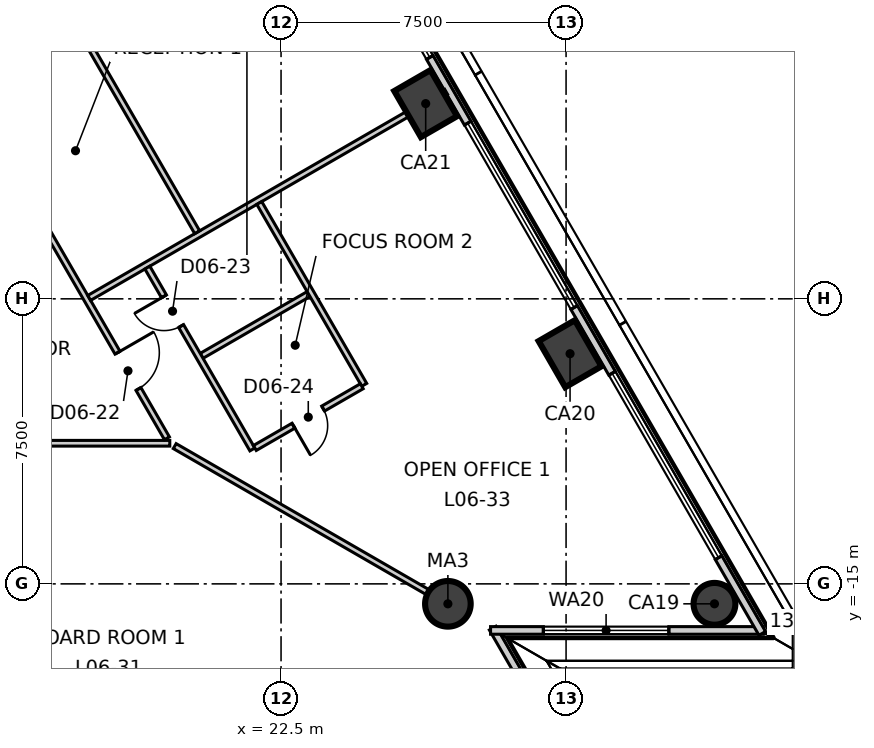
"""IFC4 building model, lengths in metres.
Left out: names, types, materials, properties, quantities, classifications, styles, units other than length and angle.
Written with IfcOpenShell. Run it as: python <this file> out.ifc"""

import sys

from ifc_helpers import new_model, si_unit, direction, frame, frame_2d, origin, origin_2d, place, context, subcontext, project, spatial, rectangle, circle, extrude, element, fill, save


model = new_model("IFC4")
c1 = context("Model", 3, precision=1e-05, world=origin(), true_north=direction((0.0, 1.0)))
c2 = subcontext(c1, "Body", "Model", "MODEL_VIEW")
j1 = project(units=[si_unit("LENGTHUNIT", "METRE"), si_unit("PLANEANGLEUNIT", "RADIAN")], contexts=[c1])
p1 = place(None, origin())
s1 = spatial("IfcSite", under=j1, at=p1, CompositionType="ELEMENT")
p2 = place(p1, origin())
s2 = spatial("IfcBuilding", under=s1, at=p2, CompositionType="ELEMENT")
p3 = place(p2, frame((0.0, 0.0, 35.3)))
s3 = spatial("IfcBuildingStorey", under=s2, at=p3, CompositionType="ELEMENT", Elevation=35.3)
p4 = place(p3, frame((33.905, -15.525, -0.3), z_axis=(0.0, 0.0, 1.0), x_axis=(-0.5, 0.866025403784, 0.0)))
e1 = element("IfcColumn", 1, at=p4, inside=s3, PredefinedType="COLUMN", context=c2, shape_type="SweptSolid", body=[
    extrude(circle(Radius=0.55, at=origin_2d()), origin(), (0.0, 0.0, 1.0), 4.0),
])
for number, where, z_axis, x_axis in (
    (2, (30.105, -8.944, -0.3), (0.0, 0.0, 1.0), (-0.5, 0.866, 0.0)),
    (3, (26.306, -2.363, -0.3), (0.0, 0.0, 1.0), (-0.5, 0.866, 0.0)),
):
    element("IfcColumn", number, at=place(p3, frame(where, z_axis=z_axis, x_axis=x_axis)), inside=s3, PredefinedType="COLUMN", context=c2, shape_type="SweptSolid", body=[
        extrude(rectangle(XDim=1.4, YDim=1.1, at=origin_2d()), origin(), (0.0, 0.0, 1.0), 4.0),
    ])
p5 = place(p3, frame((26.89, -15.525, -0.3), z_axis=(0.0, 0.0, 1.0), x_axis=(1.0, 0.0, 0.0)))
e4 = element("IfcColumn", 4, at=p5, inside=s3, PredefinedType="COLUMN", context=c2, shape_type="SweptSolid", body=[
    extrude(circle(Radius=0.6, at=origin_2d()), origin(), (0.0, 0.0, 1.0), 4.0),
])
p6 = place(p3, frame((31.655, -22.378, 0.0), z_axis=(0.0, 0.0, 1.0), x_axis=(-0.499930606701, 0.866065464318, 0.0)))
e5 = element("IfcWall", 5, at=p6, inside=s3, PredefinedType="ELEMENTEDWALL", context=c2, shape_type="SweptSolid", body=[
    extrude(rectangle(XDim=7.175, YDim=0.2, at=frame_2d((3.587, 0.0))), origin(), (0.0, 0.0, 1.0), 3.7),
])
p7 = place(p6, frame((1.99, 0.0, 0.9)))
e6 = element("IfcOpeningElement", 6, at=p7, cuts=e5, PredefinedType="OPENING", context=c2, shape_type="SweptSolid", body=[
    extrude(rectangle(XDim=3.3, YDim=2.5, at=frame_2d((1.65, 1.25))), frame((0.0, 0.11, 0.0), z_axis=(0.0, -1.0, 0.0), x_axis=(1.0, 0.0, 0.0)), (0.0, 0.0, 1.0), 0.22),
])
p8 = place(p3, frame((28.013, -16.225, 0.0), z_axis=(0.0, 0.0, 1.0), x_axis=(1.0, 0.0, 0.0)))
e7 = element("IfcWall", 7, at=p8, inside=s3, PredefinedType="ELEMENTEDWALL", context=c2, shape_type="SweptSolid", body=[
    extrude(rectangle(XDim=7.175, YDim=0.2, at=frame_2d((3.587, 0.0))), origin(), (0.0, 0.0, 1.0), 3.7),
])
p9 = place(p8, frame((1.39, 0.0, 0.9)))
e8 = element("IfcOpeningElement", 8, at=p9, cuts=e7, PredefinedType="OPENING", context=c2, shape_type="SweptSolid", body=[
    extrude(rectangle(XDim=3.3, YDim=2.5, at=frame_2d((1.65, 1.25))), frame((0.0, 0.11, 0.0), z_axis=(0.0, -1.0, 0.0), x_axis=(1.0, 0.0, 0.0)), (0.0, 0.0, 1.0), 0.22),
])
p10 = place(p3, frame((35.163, -16.303, 0.0), z_axis=(0.0, 0.0, 1.0), x_axis=(-0.500012207976, 0.866018355391, 0.0)))
e9 = element("IfcWall", 9, at=p10, inside=s3, PredefinedType="ELEMENTEDWALL", context=c2, shape_type="SweptSolid", body=[
    extrude(rectangle(XDim=63.381, YDim=0.2, at=frame_2d((31.69, 0.0))), origin(), (0.0, 0.0, 1.0), 3.7),
])
p11 = place(p10, frame((2.302, 0.0, 0.9)))
e10 = element("IfcOpeningElement", 10, at=p11, cuts=e9, PredefinedType="OPENING", context=c2, shape_type="SweptSolid", body=[
    extrude(rectangle(XDim=5.6, YDim=2.5, at=frame_2d((2.8, 1.25))), frame((0.0, 0.11, 0.0), z_axis=(0.0, -1.0, 0.0), x_axis=(1.0, 0.0, 0.0)), (0.0, 0.0, 1.0), 0.22),
])
p12 = place(p10, frame((9.902, 0.0, 0.9)))
e11 = element("IfcOpeningElement", 11, at=p12, cuts=e9, PredefinedType="OPENING", context=c2, shape_type="SweptSolid", body=[
    extrude(rectangle(XDim=5.6, YDim=2.5, at=frame_2d((2.8, 1.25))), frame((0.0, 0.11, 0.0), z_axis=(0.0, -1.0, 0.0), x_axis=(1.0, 0.0, 0.0)), (0.0, 0.0, 1.0), 0.22),
])
p13 = place(p10, frame((17.501, 0.0, 0.9)))
e12 = element("IfcOpeningElement", 12, at=p13, cuts=e9, PredefinedType="OPENING", context=c2, shape_type="SweptSolid", body=[
    extrude(rectangle(XDim=5.6, YDim=2.5, at=frame_2d((2.8, 1.25))), frame((0.0, 0.11, 0.0), z_axis=(0.0, -1.0, 0.0), x_axis=(1.0, 0.0, 0.0)), (0.0, 0.0, 1.0), 0.22),
])
p14 = place(p10, frame((25.101, 0.0, 0.9)))
e13 = element("IfcOpeningElement", 13, at=p14, cuts=e9, PredefinedType="OPENING", context=c2, shape_type="SweptSolid", body=[
    extrude(rectangle(XDim=5.6, YDim=2.5, at=frame_2d((2.8, 1.25))), frame((0.0, 0.11, 0.0), z_axis=(0.0, -1.0, 0.0), x_axis=(1.0, 0.0, 0.0)), (0.0, 0.0, 1.0), 0.22),
])
p15 = place(p10, frame((32.7, 0.0, 0.9)))
e14 = element("IfcOpeningElement", 14, at=p15, cuts=e9, PredefinedType="OPENING", context=c2, shape_type="SweptSolid", body=[
    extrude(rectangle(XDim=5.6, YDim=2.5, at=frame_2d((2.8, 1.25))), frame((0.0, 0.11, 0.0), z_axis=(0.0, -1.0, 0.0), x_axis=(1.0, 0.0, 0.0)), (0.0, 0.0, 1.0), 0.22),
])
p16 = place(p10, frame((40.299, 0.0, 0.9)))
e15 = element("IfcOpeningElement", 15, at=p16, cuts=e9, PredefinedType="OPENING", context=c2, shape_type="SweptSolid", body=[
    extrude(rectangle(XDim=5.6, YDim=2.5, at=frame_2d((2.8, 1.25))), frame((0.0, 0.11, 0.0), z_axis=(0.0, -1.0, 0.0), x_axis=(1.0, 0.0, 0.0)), (0.0, 0.0, 1.0), 0.22),
])
p17 = place(p10, frame((47.899, 0.0, 0.9)))
e16 = element("IfcOpeningElement", 16, at=p17, cuts=e9, PredefinedType="OPENING", context=c2, shape_type="SweptSolid", body=[
    extrude(rectangle(XDim=5.6, YDim=2.5, at=frame_2d((2.8, 1.25))), frame((0.0, 0.11, 0.0), z_axis=(0.0, -1.0, 0.0), x_axis=(1.0, 0.0, 0.0)), (0.0, 0.0, 1.0), 0.22),
])
p18 = place(p10, frame((55.498, 0.0, 0.9)))
e17 = element("IfcOpeningElement", 17, at=p18, cuts=e9, PredefinedType="OPENING", context=c2, shape_type="SweptSolid", body=[
    extrude(rectangle(XDim=5.6, YDim=2.5, at=frame_2d((2.8, 1.25))), frame((0.0, 0.11, 0.0), z_axis=(0.0, -1.0, 0.0), x_axis=(1.0, 0.0, 0.0)), (0.0, 0.0, 1.0), 0.22),
])
p19 = place(p3, frame((-19.422, -11.3, 0.0), z_axis=(0.0, 0.0, 1.0), x_axis=(1.0, 0.0, 0.0)))
e18 = element("IfcWall", 18, at=p19, inside=s3, PredefinedType="PARTITIONING", context=c2, shape_type="SweptSolid", body=[
    extrude(rectangle(XDim=38.994, YDim=0.15, at=frame_2d((19.497, 0.0))), origin(), (0.0, 0.0, 1.0), 3.7),
])
p20 = place(p19, frame((1.5, 0.0, 0.0)))
e19 = element("IfcOpeningElement", 19, at=p20, cuts=e18, PredefinedType="OPENING", context=c2, shape_type="SweptSolid", body=[
    extrude(rectangle(XDim=1.1, YDim=2.1, at=frame_2d((0.55, 1.05))), frame((0.0, 0.085, 0.0), z_axis=(0.0, -1.0, 0.0), x_axis=(1.0, 0.0, 0.0)), (0.0, 0.0, 1.0), 0.17),
])
p21 = place(p19, frame((8.674, 0.0, 0.0)))
e20 = element("IfcOpeningElement", 20, at=p21, cuts=e18, PredefinedType="OPENING", context=c2, shape_type="SweptSolid", body=[
    extrude(rectangle(XDim=1.0, YDim=2.1, at=frame_2d((0.5, 1.05))), frame((0.0, 0.085, 0.0), z_axis=(0.0, -1.0, 0.0), x_axis=(1.0, 0.0, 0.0)), (0.0, 0.0, 1.0), 0.17),
])
p22 = place(p19, frame((4.974, 0.0, 0.0)))
e21 = element("IfcOpeningElement", 21, at=p22, cuts=e18, PredefinedType="OPENING", context=c2, shape_type="SweptSolid", body=[
    extrude(rectangle(XDim=0.9, YDim=2.1, at=frame_2d((0.45, 1.05))), frame((0.0, 0.085, 0.0), z_axis=(0.0, -1.0, 0.0), x_axis=(1.0, 0.0, 0.0)), (0.0, 0.0, 1.0), 0.17),
])
p23 = place(p19, frame((23.273, 0.0, 0.0)))
e22 = element("IfcOpeningElement", 22, at=p23, cuts=e18, PredefinedType="OPENING", context=c2, shape_type="SweptSolid", body=[
    extrude(rectangle(XDim=1.1, YDim=2.1, at=frame_2d((0.55, 1.05))), frame((0.0, 0.085, 0.0), z_axis=(0.0, -1.0, 0.0), x_axis=(1.0, 0.0, 0.0)), (0.0, 0.0, 1.0), 0.17),
])
p24 = place(p19, frame((12.973, 0.0, 0.0)))
e23 = element("IfcOpeningElement", 23, at=p24, cuts=e18, PredefinedType="OPENING", context=c2, shape_type="SweptSolid", body=[
    extrude(rectangle(XDim=0.9, YDim=2.1, at=frame_2d((0.45, 1.05))), frame((0.0, 0.085, 0.0), z_axis=(0.0, -1.0, 0.0), x_axis=(1.0, 0.0, 0.0)), (0.0, 0.0, 1.0), 0.17),
])
p25 = place(p19, frame((16.173, 0.0, 0.0)))
e24 = element("IfcOpeningElement", 24, at=p25, cuts=e18, PredefinedType="OPENING", context=c2, shape_type="SweptSolid", body=[
    extrude(rectangle(XDim=0.9, YDim=2.1, at=frame_2d((0.45, 1.05))), frame((0.0, 0.085, 0.0), z_axis=(0.0, -1.0, 0.0), x_axis=(1.0, 0.0, 0.0)), (0.0, 0.0, 1.0), 0.17),
])
p26 = place(p19, frame((18.873, 0.0, 0.0)))
e25 = element("IfcOpeningElement", 25, at=p26, cuts=e18, PredefinedType="OPENING", context=c2, shape_type="SweptSolid", body=[
    extrude(rectangle(XDim=1.0, YDim=2.1, at=frame_2d((0.5, 1.05))), frame((0.0, 0.085, 0.0), z_axis=(0.0, -1.0, 0.0), x_axis=(1.0, 0.0, 0.0)), (0.0, 0.0, 1.0), 0.17),
])
p27 = place(p19, frame((32.471, 0.0, 0.0)))
e26 = element("IfcOpeningElement", 26, at=p27, cuts=e18, PredefinedType="OPENING", context=c2, shape_type="SweptSolid", body=[
    extrude(rectangle(XDim=1.0, YDim=2.1, at=frame_2d((0.5, 1.05))), frame((0.0, 0.085, 0.0), z_axis=(0.0, -1.0, 0.0), x_axis=(1.0, 0.0, 0.0)), (0.0, 0.0, 1.0), 0.17),
])
p28 = place(p3, frame((19.702, -11.375, 0.0), z_axis=(0.0, 0.0, 1.0), x_axis=(0.866031533484, -0.499989382899, 0.0)))
e27 = element("IfcWall", 27, at=p28, inside=s3, PredefinedType="PARTITIONING", context=c2, shape_type="SweptSolid", body=[
    extrude(rectangle(XDim=8.92, YDim=0.15, at=frame_2d((4.46, 0.0))), origin(), (0.0, 0.0, 1.0), 3.05),
])
p29 = place(p3, frame((0.075, 22.47, 0.0), z_axis=(0.0, 0.0, 1.0), x_axis=(0.500002280369, -0.866024087209, 0.0)))
e28 = element("IfcWall", 28, at=p29, inside=s3, PredefinedType="PARTITIONING", context=c2, shape_type="SweptSolid", body=[
    extrude(rectangle(XDim=38.844, YDim=0.15, at=frame_2d((19.422, 0.0))), origin(), (0.0, 0.0, 1.0), 3.7),
])
p30 = place(p29, frame((36.244, 0.0, 0.0)))
e29 = element("IfcOpeningElement", 29, at=p30, cuts=e28, PredefinedType="OPENING", context=c2, shape_type="SweptSolid", body=[
    extrude(rectangle(XDim=1.1, YDim=2.1, at=frame_2d((0.55, 1.05))), frame((0.0, 0.085, 0.0), z_axis=(0.0, -1.0, 0.0), x_axis=(1.0, 0.0, 0.0)), (0.0, 0.0, 1.0), 0.17),
])
p31 = place(p29, frame((26.472, 0.0, 0.0)))
e30 = element("IfcOpeningElement", 30, at=p31, cuts=e28, PredefinedType="OPENING", context=c2, shape_type="SweptSolid", body=[
    extrude(rectangle(XDim=1.1, YDim=2.1, at=frame_2d((0.55, 1.05))), frame((0.0, 0.085, 0.0), z_axis=(0.0, -1.0, 0.0), x_axis=(1.0, 0.0, 0.0)), (0.0, 0.0, 1.0), 0.17),
])
p32 = place(p29, frame((8.872, 0.0, 0.0)))
e31 = element("IfcOpeningElement", 31, at=p32, cuts=e28, PredefinedType="OPENING", context=c2, shape_type="SweptSolid", body=[
    extrude(rectangle(XDim=1.1, YDim=2.1, at=frame_2d((0.55, 1.05))), frame((0.0, 0.085, 0.0), z_axis=(0.0, -1.0, 0.0), x_axis=(1.0, 0.0, 0.0)), (0.0, 0.0, 1.0), 0.17),
])
p33 = place(p29, frame((17.672, 0.0, 0.0)))
e32 = element("IfcOpeningElement", 32, at=p33, cuts=e28, PredefinedType="OPENING", context=c2, shape_type="SweptSolid", body=[
    extrude(rectangle(XDim=0.9, YDim=2.1, at=frame_2d((0.45, 1.05))), frame((0.0, 0.085, 0.0), z_axis=(0.0, -1.0, 0.0), x_axis=(1.0, 0.0, 0.0)), (0.0, 0.0, 1.0), 0.17),
])
p34 = place(p29, frame((15.272, 0.0, 0.0)))
e33 = element("IfcOpeningElement", 33, at=p34, cuts=e28, PredefinedType="OPENING", context=c2, shape_type="SweptSolid", body=[
    extrude(rectangle(XDim=0.9, YDim=2.1, at=frame_2d((0.45, 1.05))), frame((0.0, 0.085, 0.0), z_axis=(0.0, -1.0, 0.0), x_axis=(1.0, 0.0, 0.0)), (0.0, 0.0, 1.0), 0.17),
])
p35 = place(p29, frame((1.473, 0.0, 0.0)))
e34 = element("IfcOpeningElement", 34, at=p35, cuts=e28, PredefinedType="OPENING", context=c2, shape_type="SweptSolid", body=[
    extrude(rectangle(XDim=1.1, YDim=2.1, at=frame_2d((0.55, 1.05))), frame((0.0, 0.085, 0.0), z_axis=(0.0, -1.0, 0.0), x_axis=(1.0, 0.0, 0.0)), (0.0, 0.0, 1.0), 0.17),
])
p36 = place(p3, frame((17.451, -7.476, 0.0), z_axis=(0.0, 0.0, 1.0), x_axis=(0.866002640836, 0.50003942451, 0.0)))
e35 = element("IfcWall", 35, at=p36, inside=s3, PredefinedType="PARTITIONING", context=c2, shape_type="SweptSolid", body=[
    extrude(rectangle(XDim=10.845, YDim=0.15, at=frame_2d((5.423, 0.0))), origin(), (0.0, 0.0, 1.0), 3.7),
])
p37 = place(p3, frame((12.768, 7.285, 0.0), z_axis=(0.0, 0.0, 1.0), x_axis=(0.500015945769, -0.866016197294, 0.0)))
e36 = element("IfcWall", 36, at=p37, inside=s3, PredefinedType="PARTITIONING", context=c2, shape_type="SweptSolid", body=[
    extrude(rectangle(XDim=15.049, YDim=0.15, at=frame_2d((7.525, 0.0))), origin(), (0.0, 0.0, 1.0), 3.7),
])
p38 = place(p37, frame((7.074, 0.0, 0.0)))
e37 = element("IfcOpeningElement", 37, at=p38, cuts=e36, PredefinedType="OPENING", context=c2, shape_type="SweptSolid", body=[
    extrude(rectangle(XDim=1.0, YDim=2.1, at=frame_2d((0.5, 1.05))), frame((0.0, 0.085, 0.0), z_axis=(0.0, -1.0, 0.0), x_axis=(1.0, 0.0, 0.0)), (0.0, 0.0, 1.0), 0.17),
])
p39 = place(p3, frame((20.41, -9.0, 0.0), z_axis=(0.0, 0.0, 1.0), x_axis=(0.86599666273, 0.500049777664, 0.0)))
e38 = element("IfcWall", 38, at=p39, inside=s3, PredefinedType="PARTITIONING", context=c2, shape_type="SweptSolid", body=[
    extrude(rectangle(XDim=3.25, YDim=0.15, at=frame_2d((1.625, 0.0))), origin(), (0.0, 0.0, 1.0), 3.7),
])
p40 = place(p3, frame((21.927, -4.978, 0.0), z_axis=(0.0, 0.0, 1.0), x_axis=(0.499917542299, -0.866073005526, 0.0)))
e39 = element("IfcWall", 39, at=p40, inside=s3, PredefinedType="PARTITIONING", context=c2, shape_type="SweptSolid", body=[
    extrude(rectangle(XDim=5.525, YDim=0.15, at=frame_2d((2.762, 0.0))), origin(), (0.0, 0.0, 1.0), 3.7),
])
p41 = place(p3, frame((18.982, -6.678, 0.0), z_axis=(0.0, 0.0, 1.0), x_axis=(0.500083244257, -0.865977337356, 0.0)))
e40 = element("IfcWall", 40, at=p41, inside=s3, PredefinedType="PARTITIONING", context=c2, shape_type="SweptSolid", body=[
    extrude(rectangle(XDim=5.525, YDim=0.15, at=frame_2d((2.763, 0.0))), origin(), (0.0, 0.0, 1.0), 3.7),
])
p42 = place(p41, frame((0.875, 0.0, 0.0)))
e41 = element("IfcOpeningElement", 41, at=p42, cuts=e40, PredefinedType="OPENING", context=c2, shape_type="SweptSolid", body=[
    extrude(rectangle(XDim=0.9, YDim=2.1, at=frame_2d((0.45, 1.05))), frame((0.0, 0.085, 0.0), z_axis=(0.0, -1.0, 0.0), x_axis=(1.0, 0.0, 0.0)), (0.0, 0.0, 1.0), 0.17),
])
p43 = place(p3, frame((21.81, -11.425, 0.0), z_axis=(0.0, 0.0, 1.0), x_axis=(0.865977875238, 0.500082312822, 0.0)))
e42 = element("IfcWall", 42, at=p43, inside=s3, PredefinedType="PARTITIONING", context=c2, shape_type="SweptSolid", body=[
    extrude(rectangle(XDim=3.25, YDim=0.15, at=frame_2d((1.625, 0.0))), origin(), (0.0, 0.0, 1.0), 3.7),
])
p44 = place(p43, frame((1.174, 0.0, 0.0)))
e43 = element("IfcOpeningElement", 43, at=p44, cuts=e42, PredefinedType="OPENING", context=c2, shape_type="SweptSolid", body=[
    extrude(rectangle(XDim=0.9, YDim=2.1, at=frame_2d((0.45, 1.05))), frame((0.0, 0.085, 0.0), z_axis=(0.0, -1.0, 0.0), x_axis=(1.0, 0.0, 0.0)), (0.0, 0.0, 1.0), 0.17),
])
p45 = place(p9, origin())
e44 = element("IfcWindow", 44, at=p45, inside=s3, PartitioningType="SINGLE_PANEL", PredefinedType="WINDOW", context=c2, shape_type="SweptSolid", body=[
    extrude(rectangle(XDim=3.3, YDim=2.5, at=frame_2d((1.65, 1.25))), frame((0.0, 0.03, 0.0), z_axis=(0.0, -1.0, 0.0), x_axis=(1.0, 0.0, 0.0)), (0.0, 0.0, 1.0), 0.06),
])
fill(e8, e44)
p46 = place(p11, origin())
e45 = element("IfcWindow", 45, at=p46, inside=s3, PartitioningType="SINGLE_PANEL", PredefinedType="WINDOW", context=c2, shape_type="SweptSolid", body=[
    extrude(rectangle(XDim=5.6, YDim=2.5, at=frame_2d((2.8, 1.25))), frame((0.0, 0.03, 0.0), z_axis=(0.0, -1.0, 0.0), x_axis=(1.0, 0.0, 0.0)), (0.0, 0.0, 1.0), 0.06),
])
fill(e10, e45)
p47 = place(p12, origin())
e46 = element("IfcWindow", 46, at=p47, inside=s3, PartitioningType="SINGLE_PANEL", PredefinedType="WINDOW", context=c2, shape_type="SweptSolid", body=[
    extrude(rectangle(XDim=5.6, YDim=2.5, at=frame_2d((2.8, 1.25))), frame((0.0, 0.03, 0.0), z_axis=(0.0, -1.0, 0.0), x_axis=(1.0, 0.0, 0.0)), (0.0, 0.0, 1.0), 0.06),
])
fill(e11, e46)
p48 = place(p13, origin())
e47 = element("IfcWindow", 47, at=p48, inside=s3, PartitioningType="SINGLE_PANEL", PredefinedType="WINDOW", context=c2, shape_type="SweptSolid", body=[
    extrude(rectangle(XDim=5.6, YDim=2.5, at=frame_2d((2.8, 1.25))), frame((0.0, 0.03, 0.0), z_axis=(0.0, -1.0, 0.0), x_axis=(1.0, 0.0, 0.0)), (0.0, 0.0, 1.0), 0.06),
])
fill(e12, e47)
p49 = place(p30, origin())
e48 = element("IfcDoor", 48, at=p49, inside=s3, OperationType="SINGLE_SWING_RIGHT", PredefinedType="DOOR", context=c2, shape_type="SweptSolid", body=[
    extrude(rectangle(XDim=1.1, YDim=2.1, at=frame_2d((0.55, 1.05))), frame((0.0, 0.025, 0.0), z_axis=(0.0, -1.0, 0.0), x_axis=(1.0, 0.0, 0.0)), (0.0, 0.0, 1.0), 0.05),
])
fill(e29, e48)
p50 = place(p42, origin())
e49 = element("IfcDoor", 49, at=p50, inside=s3, OperationType="SINGLE_SWING_LEFT", PredefinedType="DOOR", context=c2, shape_type="SweptSolid", body=[
    extrude(rectangle(XDim=0.9, YDim=2.1, at=frame_2d((0.45, 1.05))), frame((0.0, 0.025, 0.0), z_axis=(0.0, -1.0, 0.0), x_axis=(1.0, 0.0, 0.0)), (0.0, 0.0, 1.0), 0.05),
])
fill(e41, e49)
p51 = place(p44, origin())
e50 = element("IfcDoor", 50, at=p51, inside=s3, OperationType="SINGLE_SWING_LEFT", PredefinedType="DOOR", context=c2, shape_type="SweptSolid", body=[
    extrude(rectangle(XDim=0.9, YDim=2.1, at=frame_2d((0.45, 1.05))), frame((0.0, 0.025, 0.0), z_axis=(0.0, -1.0, 0.0), x_axis=(1.0, 0.0, 0.0)), (0.0, 0.0, 1.0), 0.05),
])
fill(e43, e50)
save(model, sys.argv[1])
